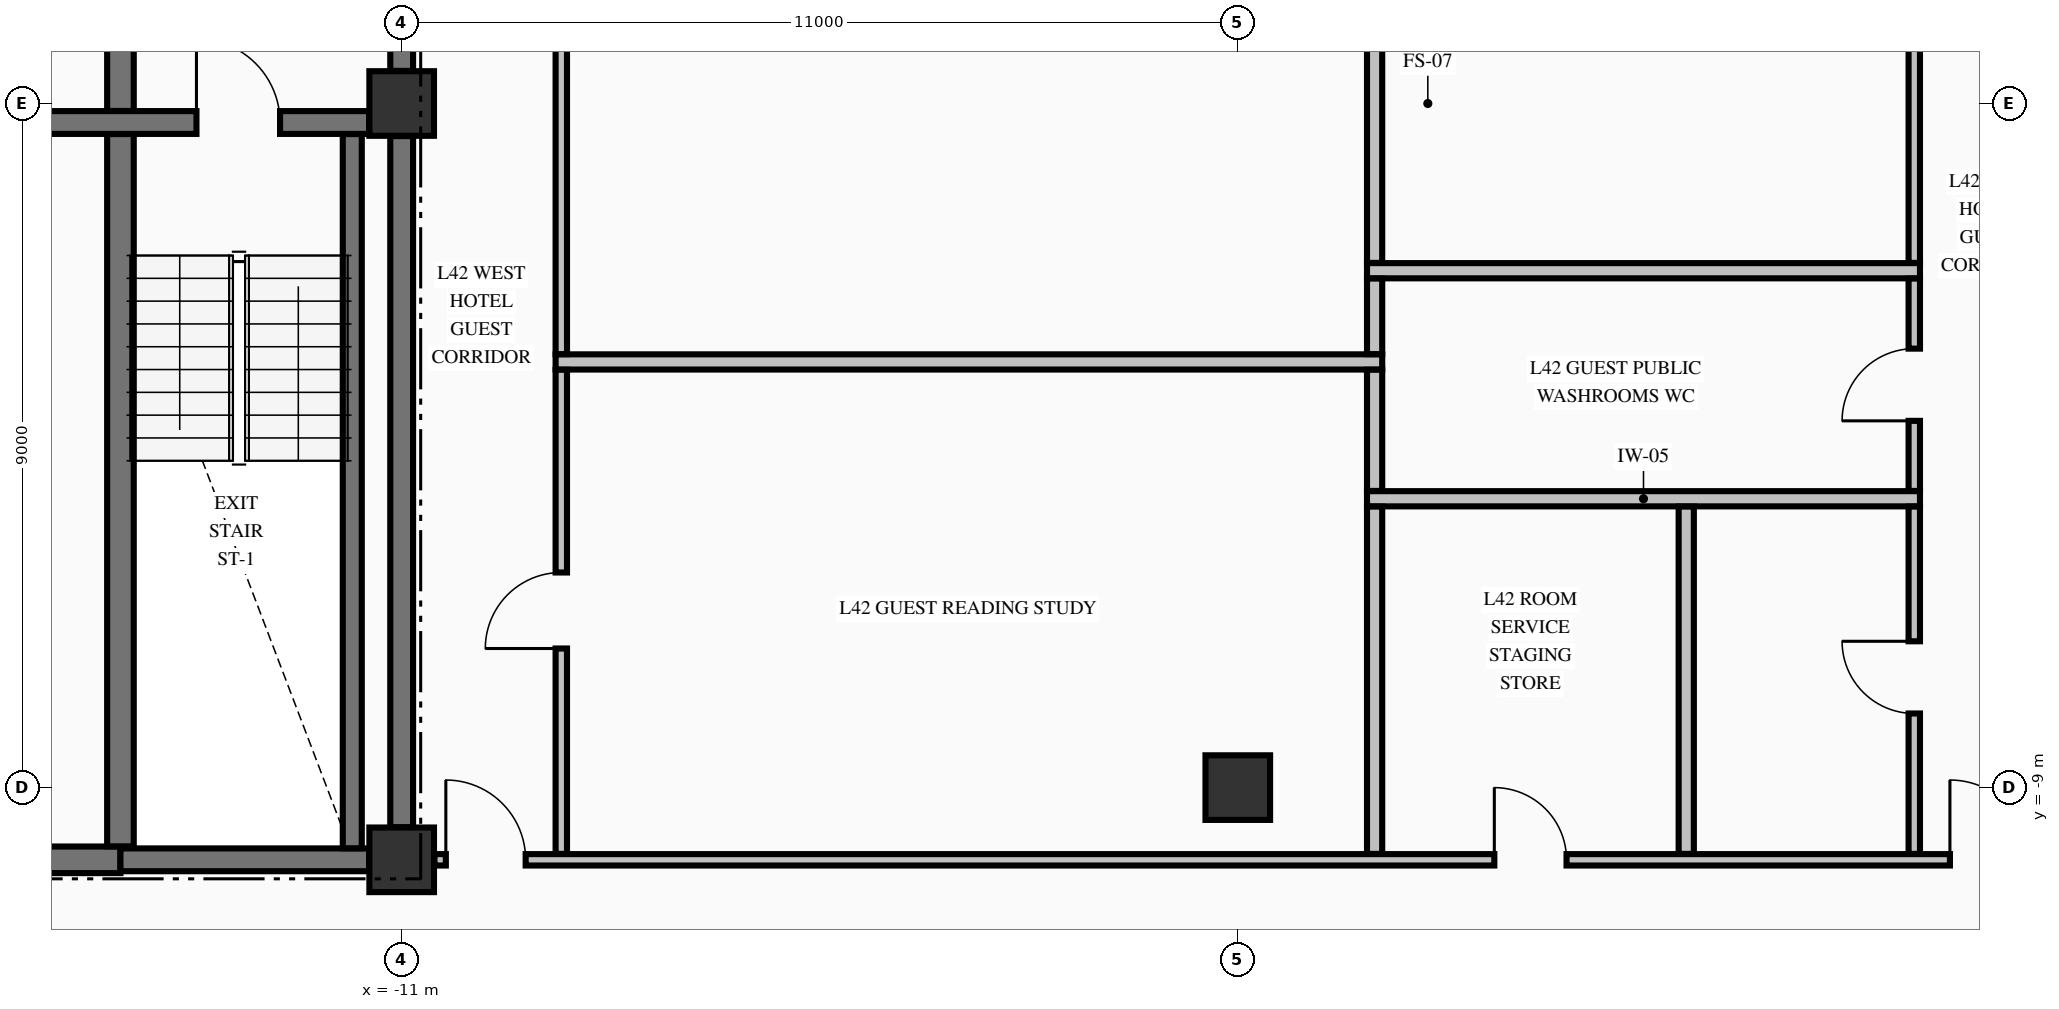
"""IFC4 building model, lengths in metres.
Left out: names, types, materials, properties, quantities, classifications, styles, units other than length and angle.
Written with IfcOpenShell. Run it as: python <this file> out.ifc"""

import sys

from ifc_helpers import new_model, si_unit, direction, frame, frame_2d, origin, origin_2d, place, context, subcontext, project, spatial, rectangle, extrude, element, fill, save


model = new_model("IFC4")
c1 = context("Model", 3, precision=1e-05, world=origin(), true_north=direction((0.0, 1.0)))
c2 = subcontext(c1, "Body", "Model", "MODEL_VIEW")
j1 = project(units=[si_unit("LENGTHUNIT", "METRE"), si_unit("PLANEANGLEUNIT", "RADIAN")], contexts=[c1])
p1 = place(None, origin())
s1 = spatial("IfcSite", under=j1, at=p1, CompositionType="ELEMENT")
p2 = place(p1, origin())
s2 = spatial("IfcBuilding", under=s1, at=p2, CompositionType="ELEMENT")
p3 = place(p2, frame((0.0, 0.0, 166.06)))
s3 = spatial("IfcBuildingStorey", under=s2, at=p3, CompositionType="ELEMENT", Elevation=166.06)
for number, where, z_axis, x_axis in (
    (1, (-11.0, -9.95, -0.25), (0.0, 0.0, 1.0), (1.0, 0.0, 0.0)),
    (2, (-11.0, 0.0, -0.25), (0.0, 0.0, 1.0), (1.0, 0.0, 0.0)),
    (3, (0.0, -9.0, -0.25), (0.0, 0.0, 1.0), (1.0, 0.0, 0.0)),
):
    element("IfcColumn", number, at=place(p3, frame(where, z_axis=z_axis, x_axis=x_axis)), inside=s3, PredefinedType="COLUMN", context=c2, shape_type="SweptSolid", body=[
        extrude(rectangle(XDim=0.85, YDim=0.85, at=origin_2d()), origin(), (0.0, 0.0, 1.0), 3.4),
    ])
p4 = place(p3, frame((-19.571, -9.95, 0.0), z_axis=(0.0, 0.0, 1.0), x_axis=(1.0, 0.0, 0.0)))
e4 = element("IfcWall", 4, at=p4, inside=s3, PredefinedType="SHEAR", context=c2, shape_type="SweptSolid", body=[
    extrude(rectangle(XDim=4.871, YDim=0.35, at=frame_2d((2.436, 0.0))), origin(), (0.0, 0.0, 1.0), 3.15),
])
p5 = place(p4, frame((0.746, 0.0, 0.0)))
e5 = element("IfcOpeningElement", 5, at=p5, cuts=e4, PredefinedType="OPENING", context=c2, shape_type="SweptSolid", body=[
    extrude(rectangle(XDim=1.05, YDim=2.15, at=frame_2d((0.525, 1.075))), frame((0.0, 0.185, 0.0), z_axis=(0.0, -1.0, 0.0), x_axis=(1.0, 0.0, 0.0)), (0.0, 0.0, 1.0), 0.37),
])
p6 = place(p3, frame((-14.7, -9.95, 0.0), z_axis=(0.0, 0.0, 1.0), x_axis=(1.0, 0.0, 0.0)))
e6 = element("IfcWall", 6, at=p6, inside=s3, PredefinedType="SHEAR", context=c2, shape_type="SweptSolid", body=[
    extrude(rectangle(XDim=3.271, YDim=0.3, at=frame_2d((1.635, 0.0))), origin(), (0.0, 0.0, 1.0), 3.15),
])
p7 = place(p3, frame((-19.571, -0.25, 0.0), z_axis=(0.0, 0.0, 1.0), x_axis=(1.0, 0.0, 0.0)))
e7 = element("IfcWall", 7, at=p7, inside=s3, PredefinedType="SHEAR", context=c2, shape_type="SweptSolid", body=[
    extrude(rectangle(XDim=8.142, YDim=0.3, at=frame_2d((4.071, 0.0))), origin(), (0.0, 0.0, 1.0), 3.15),
])
p8 = place(p7, frame((5.871, 0.0, 0.0)))
e8 = element("IfcOpeningElement", 8, at=p8, cuts=e7, PredefinedType="OPENING", context=c2, shape_type="SweptSolid", body=[
    extrude(rectangle(XDim=1.1, YDim=2.15, at=frame_2d((0.55, 1.075))), frame((0.0, 0.16, 0.0), z_axis=(0.0, -1.0, 0.0), x_axis=(1.0, 0.0, 0.0)), (0.0, 0.0, 1.0), 0.32),
])
p9 = place(p3, frame((-10.569, -9.95, 0.0), z_axis=(0.0, 0.0, 1.0), x_axis=(1.0, 0.0, 0.0)))
e9 = element("IfcWall", 9, at=p9, inside=s3, PredefinedType="PARTITIONING", context=c2, shape_type="SweptSolid", body=[
    extrude(rectangle(XDim=21.138, YDim=0.15, at=frame_2d((10.569, 0.0))), origin(), (0.0, 0.0, 1.0), 3.15),
])
p10 = place(p9, frame((0.15, 0.0, 0.0)))
e10 = element("IfcOpeningElement", 10, at=p10, cuts=e9, PredefinedType="OPENING", context=c2, shape_type="SweptSolid", body=[
    extrude(rectangle(XDim=1.05, YDim=2.15, at=frame_2d((0.525, 1.075))), frame((0.0, 0.085, 0.0), z_axis=(0.0, -1.0, 0.0), x_axis=(1.0, 0.0, 0.0)), (0.0, 0.0, 1.0), 0.17),
])
p11 = place(p9, frame((19.938, 0.0, 0.0)))
e11 = element("IfcOpeningElement", 11, at=p11, cuts=e9, PredefinedType="OPENING", context=c2, shape_type="SweptSolid", body=[
    extrude(rectangle(XDim=1.05, YDim=2.15, at=frame_2d((0.525, 1.075))), frame((0.0, 0.085, 0.0), z_axis=(0.0, -1.0, 0.0), x_axis=(1.0, 0.0, 0.0)), (0.0, 0.0, 1.0), 0.17),
])
p12 = place(p9, frame((13.944, 0.0, 0.0)))
e12 = element("IfcOpeningElement", 12, at=p12, cuts=e9, PredefinedType="OPENING", context=c2, shape_type="SweptSolid", body=[
    extrude(rectangle(XDim=0.95, YDim=2.15, at=frame_2d((0.475, 1.075))), frame((0.0, 0.085, 0.0), z_axis=(0.0, -1.0, 0.0), x_axis=(1.0, 0.0, 0.0)), (0.0, 0.0, 1.0), 0.17),
])
p13 = place(p3, frame((1.7, -5.2, 0.0), z_axis=(0.0, 0.0, 1.0), x_axis=(1.0, 0.0, 0.0)))
e13 = element("IfcWall", 13, at=p13, inside=s3, PredefinedType="PARTITIONING", context=c2, shape_type="SweptSolid", body=[
    extrude(rectangle(XDim=7.275, YDim=0.2, at=frame_2d((3.638, 0.0))), origin(), (0.0, 0.0, 1.0), 3.15),
])
p14 = place(p3, frame((-8.975, -3.4, 0.0), z_axis=(0.0, 0.0, 1.0), x_axis=(1.0, 0.0, 0.0)))
e14 = element("IfcWall", 14, at=p14, inside=s3, PredefinedType="PARTITIONING", context=c2, shape_type="SweptSolid", body=[
    extrude(rectangle(XDim=10.875, YDim=0.2, at=frame_2d((5.438, 0.0))), origin(), (0.0, 0.0, 1.0), 3.15),
])
p15 = place(p3, frame((1.7, -2.2, 0.0), z_axis=(0.0, 0.0, 1.0), x_axis=(1.0, 0.0, 0.0)))
e15 = element("IfcWall", 15, at=p15, inside=s3, PredefinedType="PARTITIONING", context=c2, shape_type="SweptSolid", body=[
    extrude(rectangle(XDim=7.275, YDim=0.2, at=frame_2d((3.638, 0.0))), origin(), (0.0, 0.0, 1.0), 3.15),
])
p16 = place(p3, frame((-14.7, -9.773, 0.0), z_axis=(0.0, 0.0, 1.0), x_axis=(0.0, 1.0, 0.0)))
e16 = element("IfcWall", 16, at=p16, inside=s3, PredefinedType="SHEAR", context=c2, shape_type="SweptSolid", body=[
    extrude(rectangle(XDim=9.371, YDim=0.35, at=frame_2d((4.686, 0.0))), origin(), (0.0, 0.0, 1.0), 3.15),
])
p17 = place(p3, frame((-14.7, -0.098, 0.0), z_axis=(0.0, 0.0, 1.0), x_axis=(0.0, 1.0, 0.0)))
e17 = element("IfcWall", 17, at=p17, inside=s3, PredefinedType="SHEAR", context=c2, shape_type="SweptSolid", body=[
    extrude(rectangle(XDim=2.846, YDim=0.35, at=frame_2d((1.423, 0.0))), origin(), (0.0, 0.0, 1.0), 3.15),
])
p18 = place(p3, frame((-11.65, -9.798, 0.0), z_axis=(0.0, 0.0, 1.0), x_axis=(0.0, 1.0, 0.0)))
e18 = element("IfcWall", 18, at=p18, inside=s3, PredefinedType="SOLIDWALL", context=c2, shape_type="SweptSolid", body=[
    extrude(rectangle(XDim=9.396, YDim=0.25, at=frame_2d((4.698, 0.0))), origin(), (0.0, 0.0, 1.0), 3.15),
])
p19 = place(p3, frame((-11.0, -9.521, 0.0), z_axis=(0.0, 0.0, 1.0), x_axis=(0.0, 1.0, 0.0)))
e19 = element("IfcWall", 19, at=p19, inside=s3, PredefinedType="SHEAR", context=c2, shape_type="SweptSolid", body=[
    extrude(rectangle(XDim=9.092, YDim=0.3, at=frame_2d((4.546, 0.0))), origin(), (0.0, 0.0, 1.0), 3.15),
])
p20 = place(p3, frame((-11.0, 0.429, 0.0), z_axis=(0.0, 0.0, 1.0), x_axis=(0.0, 1.0, 0.0)))
e20 = element("IfcWall", 20, at=p20, inside=s3, PredefinedType="SHEAR", context=c2, shape_type="SweptSolid", body=[
    extrude(rectangle(XDim=2.319, YDim=0.3, at=frame_2d((1.16, 0.0))), origin(), (0.0, 0.0, 1.0), 3.15),
])
p21 = place(p20, frame((0.671, 0.0, 0.0)))
e21 = element("IfcOpeningElement", 21, at=p21, cuts=e20, PredefinedType="OPENING", context=c2, shape_type="SweptSolid", body=[
    extrude(rectangle(XDim=1.1, YDim=2.15, at=frame_2d((0.55, 1.075))), frame((0.0, 0.16, 0.0), z_axis=(0.0, -1.0, 0.0), x_axis=(1.0, 0.0, 0.0)), (0.0, 0.0, 1.0), 0.32),
])
p22 = place(p3, frame((-8.9, -9.872, 0.0), z_axis=(0.0, 0.0, 1.0), x_axis=(0.0, 1.0, 0.0)))
e22 = element("IfcWall", 22, at=p22, inside=s3, PredefinedType="PARTITIONING", context=c2, shape_type="SweptSolid", body=[
    extrude(rectangle(XDim=6.369, YDim=0.15, at=frame_2d((3.185, 0.0))), origin(), (0.0, 0.0, 1.0), 3.15),
])
p23 = place(p22, frame((2.702, 0.0, 0.0)))
e23 = element("IfcOpeningElement", 23, at=p23, cuts=e22, PredefinedType="OPENING", context=c2, shape_type="SweptSolid", body=[
    extrude(rectangle(XDim=1.0, YDim=2.15, at=frame_2d((0.5, 1.075))), frame((0.0, 0.085, 0.0), z_axis=(0.0, -1.0, 0.0), x_axis=(1.0, 0.0, 0.0)), (0.0, 0.0, 1.0), 0.17),
])
p24 = place(p3, frame((-8.9, -3.297, 0.0), z_axis=(0.0, 0.0, 1.0), x_axis=(0.0, 1.0, 0.0)))
e24 = element("IfcWall", 24, at=p24, inside=s3, PredefinedType="PARTITIONING", context=c2, shape_type="SweptSolid", body=[
    extrude(rectangle(XDim=13.719, YDim=0.15, at=frame_2d((6.86, 0.0))), origin(), (0.0, 0.0, 1.0), 3.15),
])
p25 = place(p24, frame((6.297, 0.0, 0.0)))
e25 = element("IfcOpeningElement", 25, at=p25, cuts=e24, PredefinedType="OPENING", context=c2, shape_type="SweptSolid", body=[
    extrude(rectangle(XDim=1.1, YDim=2.15, at=frame_2d((0.55, 1.075))), frame((0.0, 0.085, 0.0), z_axis=(0.0, -1.0, 0.0), x_axis=(1.0, 0.0, 0.0)), (0.0, 0.0, 1.0), 0.17),
])
p26 = place(p3, frame((1.8, -9.872, 0.0), z_axis=(0.0, 0.0, 1.0), x_axis=(0.0, 1.0, 0.0)))
e26 = element("IfcWall", 26, at=p26, inside=s3, PredefinedType="PARTITIONING", context=c2, shape_type="SweptSolid", body=[
    extrude(rectangle(XDim=4.569, YDim=0.2, at=frame_2d((2.285, 0.0))), origin(), (0.0, 0.0, 1.0), 3.15),
])
p27 = place(p3, frame((1.8, -5.097, 0.0), z_axis=(0.0, 0.0, 1.0), x_axis=(0.0, 1.0, 0.0)))
e27 = element("IfcWall", 27, at=p27, inside=s3, PredefinedType="PARTITIONING", context=c2, shape_type="SweptSolid", body=[
    extrude(rectangle(XDim=1.594, YDim=0.2, at=frame_2d((0.797, 0.0))), origin(), (0.0, 0.0, 1.0), 3.15),
])
p28 = place(p3, frame((1.8, -3.297, 0.0), z_axis=(0.0, 0.0, 1.0), x_axis=(0.0, 1.0, 0.0)))
e28 = element("IfcWall", 28, at=p28, inside=s3, PredefinedType="PARTITIONING", context=c2, shape_type="SweptSolid", body=[
    extrude(rectangle(XDim=0.994, YDim=0.2, at=frame_2d((0.497, 0.0))), origin(), (0.0, 0.0, 1.0), 3.15),
])
p29 = place(p3, frame((1.8, -2.097, 0.0), z_axis=(0.0, 0.0, 1.0), x_axis=(0.0, 1.0, 0.0)))
e29 = element("IfcWall", 29, at=p29, inside=s3, PredefinedType="PARTITIONING", context=c2, shape_type="SweptSolid", body=[
    extrude(rectangle(XDim=12.519, YDim=0.2, at=frame_2d((6.26, 0.0))), origin(), (0.0, 0.0, 1.0), 3.15),
])
p30 = place(p3, frame((5.9, -9.872, 0.0), z_axis=(0.0, 0.0, 1.0), x_axis=(0.0, 1.0, 0.0)))
e30 = element("IfcWall", 30, at=p30, inside=s3, PredefinedType="PARTITIONING", context=c2, shape_type="SweptSolid", body=[
    extrude(rectangle(XDim=4.569, YDim=0.2, at=frame_2d((2.285, 0.0))), origin(), (0.0, 0.0, 1.0), 3.15),
])
p31 = place(p3, frame((8.9, -9.872, 0.0), z_axis=(0.0, 0.0, 1.0), x_axis=(0.0, 1.0, 0.0)))
e31 = element("IfcWall", 31, at=p31, inside=s3, PredefinedType="PARTITIONING", context=c2, shape_type="SweptSolid", body=[
    extrude(rectangle(XDim=4.569, YDim=0.15, at=frame_2d((2.285, 0.0))), origin(), (0.0, 0.0, 1.0), 3.15),
])
p32 = place(p31, frame((1.847, 0.0, 0.0)))
e32 = element("IfcOpeningElement", 32, at=p32, cuts=e31, PredefinedType="OPENING", context=c2, shape_type="SweptSolid", body=[
    extrude(rectangle(XDim=0.95, YDim=2.15, at=frame_2d((0.475, 1.075))), frame((0.0, 0.085, 0.0), z_axis=(0.0, -1.0, 0.0), x_axis=(1.0, 0.0, 0.0)), (0.0, 0.0, 1.0), 0.17),
])
p33 = place(p3, frame((8.9, -5.097, 0.0), z_axis=(0.0, 0.0, 1.0), x_axis=(0.0, 1.0, 0.0)))
e33 = element("IfcWall", 33, at=p33, inside=s3, PredefinedType="PARTITIONING", context=c2, shape_type="SweptSolid", body=[
    extrude(rectangle(XDim=2.794, YDim=0.15, at=frame_2d((1.397, 0.0))), origin(), (0.0, 0.0, 1.0), 3.15),
])
p34 = place(p33, frame((0.922, 0.0, 0.0)))
e34 = element("IfcOpeningElement", 34, at=p34, cuts=e33, PredefinedType="OPENING", context=c2, shape_type="SweptSolid", body=[
    extrude(rectangle(XDim=0.95, YDim=2.15, at=frame_2d((0.475, 1.075))), frame((0.0, 0.085, 0.0), z_axis=(0.0, -1.0, 0.0), x_axis=(1.0, 0.0, 0.0)), (0.0, 0.0, 1.0), 0.17),
])
p35 = place(p3, frame((8.9, -2.097, 0.0), z_axis=(0.0, 0.0, 1.0), x_axis=(0.0, 1.0, 0.0)))
e35 = element("IfcWall", 35, at=p35, inside=s3, PredefinedType="PARTITIONING", context=c2, shape_type="SweptSolid", body=[
    extrude(rectangle(XDim=12.519, YDim=0.15, at=frame_2d((6.26, 0.0))), origin(), (0.0, 0.0, 1.0), 3.15),
])
p36 = place(p35, frame((5.697, 0.0, 0.0)))
e36 = element("IfcOpeningElement", 36, at=p36, cuts=e35, PredefinedType="OPENING", context=c2, shape_type="SweptSolid", body=[
    extrude(rectangle(XDim=1.1, YDim=2.15, at=frame_2d((0.55, 1.075))), frame((0.0, 0.085, 0.0), z_axis=(0.0, -1.0, 0.0), x_axis=(1.0, 0.0, 0.0)), (0.0, 0.0, 1.0), 0.17),
])
p37 = place(p8, origin())
e37 = element("IfcDoor", 37, at=p37, inside=s3, OperationType="SINGLE_SWING_LEFT", PredefinedType="DOOR", context=c2, shape_type="SweptSolid", body=[
    extrude(rectangle(XDim=1.1, YDim=2.15, at=frame_2d((0.55, 1.075))), frame((0.0, 0.025, 0.0), z_axis=(0.0, -1.0, 0.0), x_axis=(1.0, 0.0, 0.0)), (0.0, 0.0, 1.0), 0.05),
])
fill(e8, e37)
p38 = place(p10, origin())
e38 = element("IfcDoor", 38, at=p38, inside=s3, OperationType="SINGLE_SWING_LEFT", PredefinedType="DOOR", context=c2, shape_type="SweptSolid", body=[
    extrude(rectangle(XDim=1.05, YDim=2.15, at=frame_2d((0.525, 1.075))), frame((0.0, 0.025, 0.0), z_axis=(0.0, -1.0, 0.0), x_axis=(1.0, 0.0, 0.0)), (0.0, 0.0, 1.0), 0.05),
])
fill(e10, e38)
p39 = place(p11, origin())
e39 = element("IfcDoor", 39, at=p39, inside=s3, OperationType="SINGLE_SWING_LEFT", PredefinedType="DOOR", context=c2, shape_type="SweptSolid", body=[
    extrude(rectangle(XDim=1.05, YDim=2.15, at=frame_2d((0.525, 1.075))), frame((0.0, 0.025, 0.0), z_axis=(0.0, -1.0, 0.0), x_axis=(1.0, 0.0, 0.0)), (0.0, 0.0, 1.0), 0.05),
])
fill(e11, e39)
p40 = place(p23, origin())
e40 = element("IfcDoor", 40, at=p40, inside=s3, OperationType="SINGLE_SWING_LEFT", PredefinedType="DOOR", context=c2, shape_type="SweptSolid", body=[
    extrude(rectangle(XDim=1.0, YDim=2.15, at=frame_2d((0.5, 1.075))), frame((0.0, 0.025, 0.0), z_axis=(0.0, -1.0, 0.0), x_axis=(1.0, 0.0, 0.0)), (0.0, 0.0, 1.0), 0.05),
])
fill(e23, e40)
p41 = place(p34, origin())
e41 = element("IfcDoor", 41, at=p41, inside=s3, OperationType="SINGLE_SWING_LEFT", PredefinedType="DOOR", context=c2, shape_type="SweptSolid", body=[
    extrude(rectangle(XDim=0.95, YDim=2.15, at=frame_2d((0.475, 1.075))), frame((0.0, 0.025, 0.0), z_axis=(0.0, -1.0, 0.0), x_axis=(1.0, 0.0, 0.0)), (0.0, 0.0, 1.0), 0.05),
])
fill(e34, e41)
p42 = place(p32, origin())
e42 = element("IfcDoor", 42, at=p42, inside=s3, OperationType="SINGLE_SWING_RIGHT", PredefinedType="DOOR", context=c2, shape_type="SweptSolid", body=[
    extrude(rectangle(XDim=0.95, YDim=2.15, at=frame_2d((0.475, 1.075))), frame((0.0, 0.025, 0.0), z_axis=(0.0, -1.0, 0.0), x_axis=(1.0, 0.0, 0.0)), (0.0, 0.0, 1.0), 0.05),
])
fill(e32, e42)
p43 = place(p12, origin())
e43 = element("IfcDoor", 43, at=p43, inside=s3, OperationType="SINGLE_SWING_LEFT", PredefinedType="DOOR", context=c2, shape_type="SweptSolid", body=[
    extrude(rectangle(XDim=0.95, YDim=2.15, at=frame_2d((0.475, 1.075))), frame((0.0, 0.025, 0.0), z_axis=(0.0, -1.0, 0.0), x_axis=(1.0, 0.0, 0.0)), (0.0, 0.0, 1.0), 0.05),
])
fill(e12, e43)
save(model, sys.argv[1])
